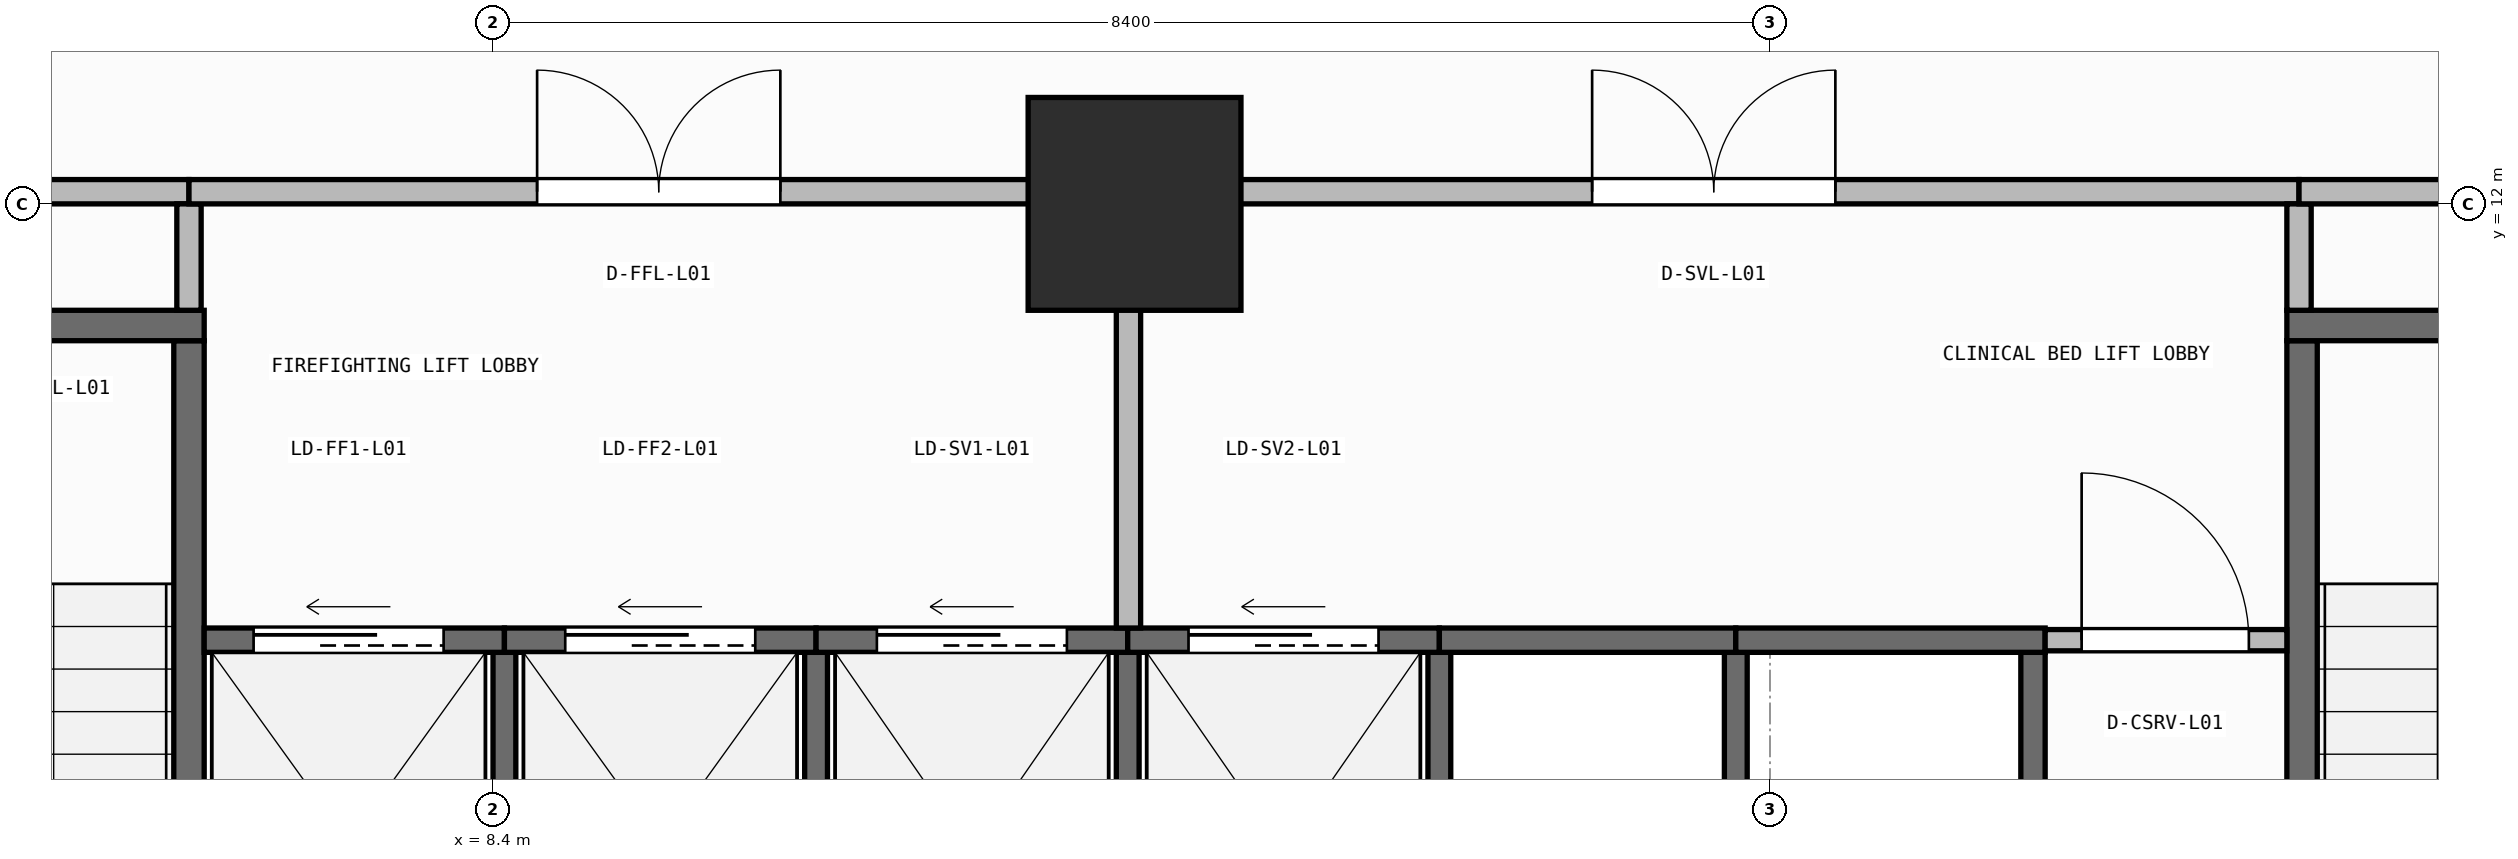
"""IFC4 building model, lengths in metres.
Left out: names, types, materials, properties, quantities, classifications, styles, units other than length and angle.
Written with IfcOpenShell. Run it as: python <this file> out.ifc"""

import sys

from ifc_helpers import new_model, si_unit, direction, frame, frame_2d, origin, origin_2d, place, context, subcontext, project, spatial, rectangle, extrude, element, fill, save


model = new_model("IFC4")
c1 = context("Model", 3, precision=1e-05, world=origin(), true_north=direction((0.0, 1.0)))
c2 = subcontext(c1, "Body", "Model", "MODEL_VIEW")
j1 = project(units=[si_unit("LENGTHUNIT", "METRE"), si_unit("PLANEANGLEUNIT", "RADIAN")], contexts=[c1])
p1 = place(None, origin())
s1 = spatial("IfcSite", under=j1, at=p1, CompositionType="ELEMENT")
p2 = place(p1, origin())
s2 = spatial("IfcBuilding", under=s1, at=p2, CompositionType="ELEMENT")
p3 = place(p2, frame((0.0, 0.0, 4.5)))
s3 = spatial("IfcBuildingStorey", under=s2, at=p3, CompositionType="ELEMENT", Elevation=4.5)
p4 = place(p3, frame((12.62, 12.0, 0.0), z_axis=(0.0, 0.0, 1.0), x_axis=(1.0, 0.0, 0.0)))
e1 = element("IfcColumn", 1, at=p4, inside=s3, PredefinedType="COLUMN", context=c2, shape_type="SweptSolid", body=[
    extrude(rectangle(XDim=1.4, YDim=1.4, at=origin_2d()), origin(), (0.0, 0.0, 1.0), 4.5),
])
p5 = place(p3, frame((6.4, 3.5, 0.0), z_axis=(0.0, 0.0, 1.0), x_axis=(0.0, 1.0, 0.0)))
e2 = element("IfcWall", 2, at=p5, inside=s3, PredefinedType="SHEAR", context=c2, shape_type="SweptSolid", body=[
    extrude(rectangle(XDim=7.6, YDim=0.2, at=frame_2d((3.8, 0.0))), origin(), (0.0, 0.0, 1.0), 4.25),
])
p6 = place(p3, frame((2.8, 11.2, 0.0), z_axis=(0.0, 0.0, 1.0), x_axis=(1.0, 0.0, 0.0)))
e3 = element("IfcWall", 3, at=p6, inside=s3, PredefinedType="SHEAR", context=c2, shape_type="SweptSolid", body=[
    extrude(rectangle(XDim=3.7, YDim=0.2, at=frame_2d((1.85, 0.0))), origin(), (0.0, 0.0, 1.0), 4.25),
])
p7 = place(p6, frame((1.2, 0.0, 0.0)))
e4 = element("IfcOpeningElement", 4, at=p7, cuts=e3, PredefinedType="OPENING", context=c2, shape_type="SweptSolid", body=[
    extrude(rectangle(XDim=1.3, YDim=2.15, at=frame_2d((0.65, 1.075))), frame((0.0, 0.11, 0.0), z_axis=(0.0, -1.0, 0.0), x_axis=(1.0, 0.0, 0.0)), (0.0, 0.0, 1.0), 0.22),
])
p8 = place(p3, frame((20.3, 3.5, 0.0), z_axis=(0.0, 0.0, 1.0), x_axis=(0.0, 1.0, 0.0)))
e5 = element("IfcWall", 5, at=p8, inside=s3, PredefinedType="SHEAR", context=c2, shape_type="SweptSolid", body=[
    extrude(rectangle(XDim=7.6, YDim=0.2, at=frame_2d((3.8, 0.0))), origin(), (0.0, 0.0, 1.0), 4.25),
])
p9 = place(p3, frame((20.2, 11.2, 0.0), z_axis=(0.0, 0.0, 1.0), x_axis=(1.0, 0.0, 0.0)))
e6 = element("IfcWall", 6, at=p9, inside=s3, PredefinedType="SHEAR", context=c2, shape_type="SweptSolid", body=[
    extrude(rectangle(XDim=3.7, YDim=0.2, at=frame_2d((1.85, 0.0))), origin(), (0.0, 0.0, 1.0), 4.25),
])
p10 = place(p9, frame((1.2, 0.0, 0.0)))
e7 = element("IfcOpeningElement", 7, at=p10, cuts=e6, PredefinedType="OPENING", context=c2, shape_type="SweptSolid", body=[
    extrude(rectangle(XDim=1.3, YDim=2.15, at=frame_2d((0.65, 1.075))), frame((0.0, 0.11, 0.0), z_axis=(0.0, -1.0, 0.0), x_axis=(1.0, 0.0, 0.0)), (0.0, 0.0, 1.0), 0.22),
])
p11 = place(p3, frame((18.53, 6.3, 0.0), z_axis=(0.0, 0.0, 1.0), x_axis=(0.0, 1.0, 0.0)))
e8 = element("IfcWall", 8, at=p11, inside=s3, PredefinedType="SHEAR", context=c2, shape_type="SweptSolid", body=[
    extrude(rectangle(XDim=2.75, YDim=0.16, at=frame_2d((1.375, 0.0))), origin(), (0.0, 0.0, 1.0), 4.25),
])
for number, where, z_axis, x_axis in (
    (9, (8.475, 6.3, 0.0), (0.0, 0.0, 1.0), (0.0, 1.0, 0.0)),
    (10, (10.525, 6.3, 0.0), (0.0, 0.0, 1.0), (0.0, 1.0, 0.0)),
    (11, (12.575, 6.3, 0.0), (0.0, 0.0, 1.0), (0.0, 1.0, 0.0)),
    (12, (14.625, 6.3, 0.0), (0.0, 0.0, 1.0), (0.0, 1.0, 0.0)),
    (13, (16.575, 6.3, 0.0), (0.0, 0.0, 1.0), (0.0, 1.0, 0.0)),
):
    element("IfcWall", number, at=place(p3, frame(where, z_axis=z_axis, x_axis=x_axis)), inside=s3, PredefinedType="SHEAR", context=c2, shape_type="SweptSolid", body=[
        extrude(rectangle(XDim=2.75, YDim=0.15, at=frame_2d((1.375, 0.0))), origin(), (0.0, 0.0, 1.0), 4.25),
    ])
p12 = place(p3, frame((6.5, 9.13, 0.0), z_axis=(0.0, 0.0, 1.0), x_axis=(1.0, 0.0, 0.0)))
e14 = element("IfcWall", 14, at=p12, inside=s3, PredefinedType="SHEAR", context=c2, shape_type="SweptSolid", body=[
    extrude(rectangle(XDim=1.975, YDim=0.16, at=frame_2d((0.988, 0.0))), origin(), (0.0, 0.0, 1.0), 4.25),
])
p13 = place(p12, frame((0.325, 0.0, 0.0)))
e15 = element("IfcOpeningElement", 15, at=p13, cuts=e14, PredefinedType="OPENING", context=c2, shape_type="SweptSolid", body=[
    extrude(rectangle(XDim=1.25, YDim=2.15, at=frame_2d((0.625, 1.075))), frame((0.0, 0.09, 0.0), z_axis=(0.0, -1.0, 0.0), x_axis=(1.0, 0.0, 0.0)), (0.0, 0.0, 1.0), 0.18),
])
p14 = place(p3, frame((8.475, 9.13, 0.0), z_axis=(0.0, 0.0, 1.0), x_axis=(1.0, 0.0, 0.0)))
e16 = element("IfcWall", 16, at=p14, inside=s3, PredefinedType="SHEAR", context=c2, shape_type="SweptSolid", body=[
    extrude(rectangle(XDim=2.05, YDim=0.16, at=frame_2d((1.025, 0.0))), origin(), (0.0, 0.0, 1.0), 4.25),
])
p15 = place(p14, frame((0.4, 0.0, 0.0)))
e17 = element("IfcOpeningElement", 17, at=p15, cuts=e16, PredefinedType="OPENING", context=c2, shape_type="SweptSolid", body=[
    extrude(rectangle(XDim=1.25, YDim=2.15, at=frame_2d((0.625, 1.075))), frame((0.0, 0.09, 0.0), z_axis=(0.0, -1.0, 0.0), x_axis=(1.0, 0.0, 0.0)), (0.0, 0.0, 1.0), 0.18),
])
p16 = place(p3, frame((10.525, 9.13, 0.0), z_axis=(0.0, 0.0, 1.0), x_axis=(1.0, 0.0, 0.0)))
e18 = element("IfcWall", 18, at=p16, inside=s3, PredefinedType="SHEAR", context=c2, shape_type="SweptSolid", body=[
    extrude(rectangle(XDim=2.05, YDim=0.16, at=frame_2d((1.025, 0.0))), origin(), (0.0, 0.0, 1.0), 4.25),
])
p17 = place(p16, frame((0.4, 0.0, 0.0)))
e19 = element("IfcOpeningElement", 19, at=p17, cuts=e18, PredefinedType="OPENING", context=c2, shape_type="SweptSolid", body=[
    extrude(rectangle(XDim=1.25, YDim=2.15, at=frame_2d((0.625, 1.075))), frame((0.0, 0.09, 0.0), z_axis=(0.0, -1.0, 0.0), x_axis=(1.0, 0.0, 0.0)), (0.0, 0.0, 1.0), 0.18),
])
p18 = place(p3, frame((12.575, 9.13, 0.0), z_axis=(0.0, 0.0, 1.0), x_axis=(1.0, 0.0, 0.0)))
e20 = element("IfcWall", 20, at=p18, inside=s3, PredefinedType="SHEAR", context=c2, shape_type="SweptSolid", body=[
    extrude(rectangle(XDim=2.05, YDim=0.16, at=frame_2d((1.025, 0.0))), origin(), (0.0, 0.0, 1.0), 4.25),
])
p19 = place(p18, frame((0.4, 0.0, 0.0)))
e21 = element("IfcOpeningElement", 21, at=p19, cuts=e20, PredefinedType="OPENING", context=c2, shape_type="SweptSolid", body=[
    extrude(rectangle(XDim=1.25, YDim=2.15, at=frame_2d((0.625, 1.075))), frame((0.0, 0.09, 0.0), z_axis=(0.0, -1.0, 0.0), x_axis=(1.0, 0.0, 0.0)), (0.0, 0.0, 1.0), 0.18),
])
p20 = place(p3, frame((14.625, 9.13, 0.0), z_axis=(0.0, 0.0, 1.0), x_axis=(1.0, 0.0, 0.0)))
e22 = element("IfcWall", 22, at=p20, inside=s3, PredefinedType="SHEAR", context=c2, shape_type="SweptSolid", body=[
    extrude(rectangle(XDim=1.95, YDim=0.16, at=frame_2d((0.975, 0.0))), origin(), (0.0, 0.0, 1.0), 4.25),
])
p21 = place(p3, frame((16.575, 9.13, 0.0), z_axis=(0.0, 0.0, 1.0), x_axis=(1.0, 0.0, 0.0)))
e23 = element("IfcWall", 23, at=p21, inside=s3, PredefinedType="SHEAR", context=c2, shape_type="SweptSolid", body=[
    extrude(rectangle(XDim=2.035, YDim=0.16, at=frame_2d((1.018, 0.0))), origin(), (0.0, 0.0, 1.0), 4.25),
])
p22 = place(p3, frame((18.61, 9.13, 0.0), z_axis=(0.0, 0.0, 1.0), x_axis=(1.0, 0.0, 0.0)))
e24 = element("IfcWall", 24, at=p22, inside=s3, PredefinedType="PARTITIONING", context=c2, shape_type="SweptSolid", body=[
    extrude(rectangle(XDim=1.59, YDim=0.14, at=frame_2d((0.795, 0.0))), origin(), (0.0, 0.0, 1.0), 4.25),
])
p23 = place(p22, frame((0.24, 0.0, 0.0)))
e25 = element("IfcOpeningElement", 25, at=p23, cuts=e24, PredefinedType="OPENING", context=c2, shape_type="SweptSolid", body=[
    extrude(rectangle(XDim=1.1, YDim=2.1, at=frame_2d((0.55, 1.05))), frame((0.0, 0.08, 0.0), z_axis=(0.0, -1.0, 0.0), x_axis=(1.0, 0.0, 0.0)), (0.0, 0.0, 1.0), 0.16),
])
p24 = place(p3, frame((2.8, 12.08, 0.0), z_axis=(0.0, 0.0, 1.0), x_axis=(1.0, 0.0, 0.0)))
e26 = element("IfcWall", 26, at=p24, inside=s3, PredefinedType="PARTITIONING", context=c2, shape_type="SweptSolid", body=[
    extrude(rectangle(XDim=3.6, YDim=0.16, at=frame_2d((1.8, 0.0))), origin(), (0.0, 0.0, 1.0), 3.425),
])
p25 = place(p24, frame((1.0, 0.0, 0.0)))
e27 = element("IfcOpeningElement", 27, at=p25, cuts=e26, PredefinedType="OPENING", context=c2, shape_type="SweptSolid", body=[
    extrude(rectangle(XDim=1.6, YDim=2.05, at=frame_2d((0.8, 1.025))), frame((0.0, 0.09, 0.0), z_axis=(0.0, -1.0, 0.0), x_axis=(1.0, 0.0, 0.0)), (0.0, 0.0, 1.0), 0.18),
])
p26 = place(p3, frame((6.4, 11.3, 0.0), z_axis=(0.0, 0.0, 1.0), x_axis=(0.0, 1.0, 0.0)))
e28 = element("IfcWall", 28, at=p26, inside=s3, PredefinedType="PARTITIONING", context=c2, shape_type="SweptSolid", body=[
    extrude(rectangle(XDim=0.7, YDim=0.16, at=frame_2d((0.35, 0.0))), origin(), (0.0, 0.0, 1.0), 4.25),
])
p27 = place(p3, frame((6.4, 12.08, 0.0), z_axis=(0.0, 0.0, 1.0), x_axis=(1.0, 0.0, 0.0)))
e29 = element("IfcWall", 29, at=p27, inside=s3, PredefinedType="PARTITIONING", context=c2, shape_type="SweptSolid", body=[
    extrude(rectangle(XDim=6.18, YDim=0.16, at=frame_2d((3.09, 0.0))), origin(), (0.0, 0.0, 1.0), 3.425),
])
p28 = place(p27, frame((2.29, 0.0, 0.0)))
e30 = element("IfcOpeningElement", 30, at=p28, cuts=e29, PredefinedType="OPENING", context=c2, shape_type="SweptSolid", body=[
    extrude(rectangle(XDim=1.6, YDim=2.05, at=frame_2d((0.8, 1.025))), frame((0.0, 0.09, 0.0), z_axis=(0.0, -1.0, 0.0), x_axis=(1.0, 0.0, 0.0)), (0.0, 0.0, 1.0), 0.18),
])
p29 = place(p3, frame((12.58, 9.21, 0.0), z_axis=(0.0, 0.0, 1.0), x_axis=(0.0, 1.0, 0.0)))
e31 = element("IfcWall", 31, at=p29, inside=s3, PredefinedType="PARTITIONING", context=c2, shape_type="SweptSolid", body=[
    extrude(rectangle(XDim=2.79, YDim=0.16, at=frame_2d((1.395, 0.0))), origin(), (0.0, 0.0, 1.0), 4.25),
])
p30 = place(p3, frame((12.58, 12.08, 0.0), z_axis=(0.0, 0.0, 1.0), x_axis=(1.0, 0.0, 0.0)))
e32 = element("IfcWall", 32, at=p30, inside=s3, PredefinedType="PARTITIONING", context=c2, shape_type="SweptSolid", body=[
    extrude(rectangle(XDim=7.7, YDim=0.16, at=frame_2d((3.85, 0.0))), origin(), (0.0, 0.0, 1.0), 3.425),
])
p31 = place(p30, frame((3.05, 0.0, 0.0)))
e33 = element("IfcOpeningElement", 33, at=p31, cuts=e32, PredefinedType="OPENING", context=c2, shape_type="SweptSolid", body=[
    extrude(rectangle(XDim=1.6, YDim=2.05, at=frame_2d((0.8, 1.025))), frame((0.0, 0.09, 0.0), z_axis=(0.0, -1.0, 0.0), x_axis=(1.0, 0.0, 0.0)), (0.0, 0.0, 1.0), 0.18),
])
p32 = place(p3, frame((20.28, 11.3, 0.0), z_axis=(0.0, 0.0, 1.0), x_axis=(0.0, 1.0, 0.0)))
e34 = element("IfcWall", 34, at=p32, inside=s3, PredefinedType="PARTITIONING", context=c2, shape_type="SweptSolid", body=[
    extrude(rectangle(XDim=0.7, YDim=0.16, at=frame_2d((0.35, 0.0))), origin(), (0.0, 0.0, 1.0), 4.25),
])
p33 = place(p3, frame((20.28, 12.08, 0.0), z_axis=(0.0, 0.0, 1.0), x_axis=(1.0, 0.0, 0.0)))
e35 = element("IfcWall", 35, at=p33, inside=s3, PredefinedType="PARTITIONING", context=c2, shape_type="SweptSolid", body=[
    extrude(rectangle(XDim=3.62, YDim=0.16, at=frame_2d((1.81, 0.0))), origin(), (0.0, 0.0, 1.0), 3.425),
])
p34 = place(p33, frame((1.01, 0.0, 0.0)))
e36 = element("IfcOpeningElement", 36, at=p34, cuts=e35, PredefinedType="OPENING", context=c2, shape_type="SweptSolid", body=[
    extrude(rectangle(XDim=1.6, YDim=2.05, at=frame_2d((0.8, 1.025))), frame((0.0, 0.09, 0.0), z_axis=(0.0, -1.0, 0.0), x_axis=(1.0, 0.0, 0.0)), (0.0, 0.0, 1.0), 0.18),
])
p35 = place(p13, origin())
e37 = element("IfcDoor", 37, at=p35, inside=s3, OperationType="SLIDING_TO_LEFT", PredefinedType="DOOR", context=c2, shape_type="SweptSolid", body=[
    extrude(rectangle(XDim=1.25, YDim=2.15, at=frame_2d((0.625, 1.075))), frame((0.0, 0.025, 0.0), z_axis=(0.0, -1.0, 0.0), x_axis=(1.0, 0.0, 0.0)), (0.0, 0.0, 1.0), 0.05),
])
fill(e15, e37)
p36 = place(p15, origin())
e38 = element("IfcDoor", 38, at=p36, inside=s3, OperationType="SLIDING_TO_LEFT", PredefinedType="DOOR", context=c2, shape_type="SweptSolid", body=[
    extrude(rectangle(XDim=1.25, YDim=2.15, at=frame_2d((0.625, 1.075))), frame((0.0, 0.025, 0.0), z_axis=(0.0, -1.0, 0.0), x_axis=(1.0, 0.0, 0.0)), (0.0, 0.0, 1.0), 0.05),
])
fill(e17, e38)
p37 = place(p17, origin())
e39 = element("IfcDoor", 39, at=p37, inside=s3, OperationType="SLIDING_TO_LEFT", PredefinedType="DOOR", context=c2, shape_type="SweptSolid", body=[
    extrude(rectangle(XDim=1.25, YDim=2.15, at=frame_2d((0.625, 1.075))), frame((0.0, 0.025, 0.0), z_axis=(0.0, -1.0, 0.0), x_axis=(1.0, 0.0, 0.0)), (0.0, 0.0, 1.0), 0.05),
])
fill(e19, e39)
p38 = place(p19, origin())
e40 = element("IfcDoor", 40, at=p38, inside=s3, OperationType="SLIDING_TO_LEFT", PredefinedType="DOOR", context=c2, shape_type="SweptSolid", body=[
    extrude(rectangle(XDim=1.25, YDim=2.15, at=frame_2d((0.625, 1.075))), frame((0.0, 0.025, 0.0), z_axis=(0.0, -1.0, 0.0), x_axis=(1.0, 0.0, 0.0)), (0.0, 0.0, 1.0), 0.05),
])
fill(e21, e40)
p39 = place(p23, origin())
e41 = element("IfcDoor", 41, at=p39, inside=s3, OperationType="SINGLE_SWING_LEFT", PredefinedType="DOOR", context=c2, shape_type="SweptSolid", body=[
    extrude(rectangle(XDim=1.1, YDim=2.1, at=frame_2d((0.55, 1.05))), frame((0.0, 0.025, 0.0), z_axis=(0.0, -1.0, 0.0), x_axis=(1.0, 0.0, 0.0)), (0.0, 0.0, 1.0), 0.05),
])
fill(e25, e41)
p40 = place(p28, origin())
e42 = element("IfcDoor", 42, at=p40, inside=s3, OperationType="DOUBLE_DOOR_SINGLE_SWING", PredefinedType="DOOR", context=c2, shape_type="SweptSolid", body=[
    extrude(rectangle(XDim=1.6, YDim=2.05, at=frame_2d((0.8, 1.025))), frame((0.0, 0.025, 0.0), z_axis=(0.0, -1.0, 0.0), x_axis=(1.0, 0.0, 0.0)), (0.0, 0.0, 1.0), 0.05),
])
fill(e30, e42)
p41 = place(p31, origin())
e43 = element("IfcDoor", 43, at=p41, inside=s3, OperationType="DOUBLE_DOOR_SINGLE_SWING", PredefinedType="DOOR", context=c2, shape_type="SweptSolid", body=[
    extrude(rectangle(XDim=1.6, YDim=2.05, at=frame_2d((0.8, 1.025))), frame((0.0, 0.025, 0.0), z_axis=(0.0, -1.0, 0.0), x_axis=(1.0, 0.0, 0.0)), (0.0, 0.0, 1.0), 0.05),
])
fill(e33, e43)
save(model, sys.argv[1])
